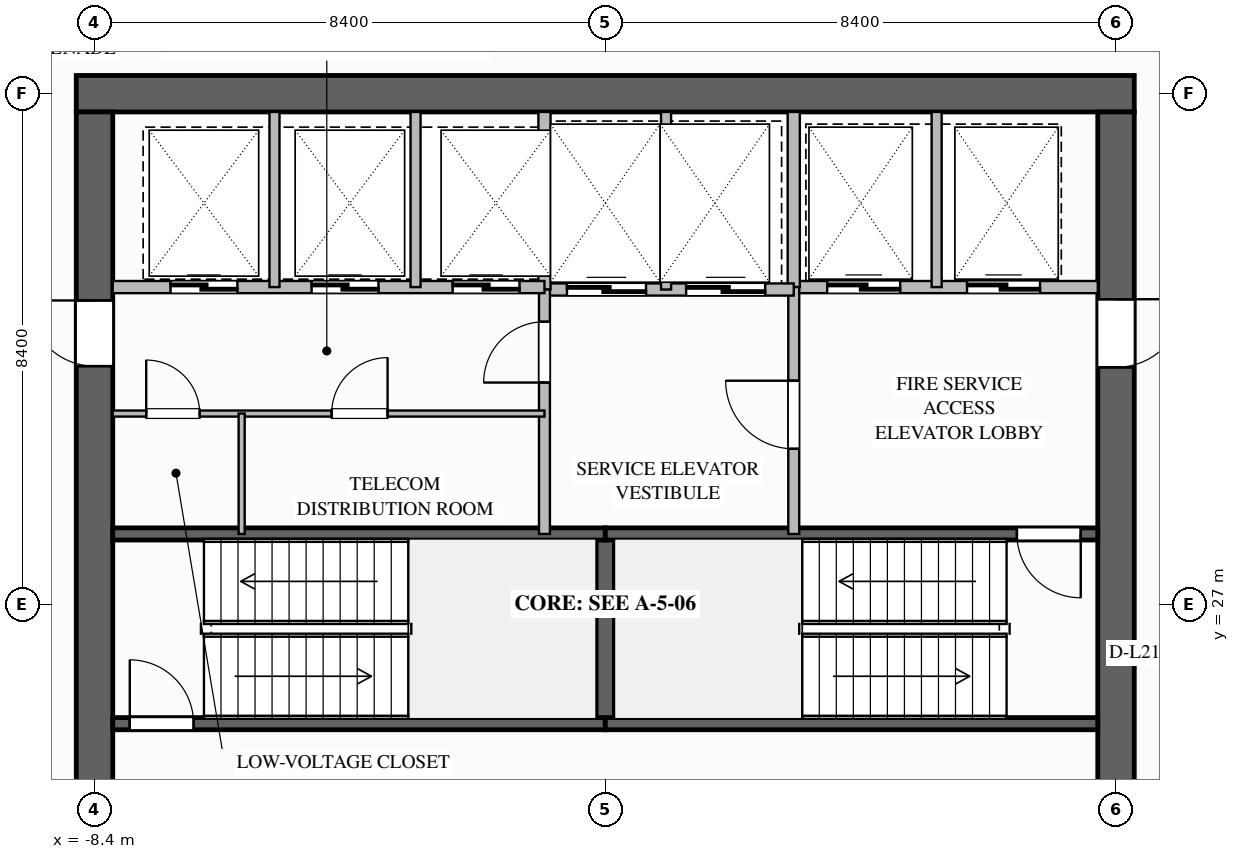
"""IFC4 building model, lengths in metres.
Left out: names, types, materials, properties, quantities, classifications, styles, units other than length and angle.
Written with IfcOpenShell. Run it as: python <this file> out.ifc"""

import sys

from ifc_helpers import new_model, si_unit, direction, frame, frame_2d, origin, place, context, subcontext, project, spatial, rectangle, extrude, element, fill, save


model = new_model("IFC4")
c1 = context("Model", 3, precision=1e-05, world=origin(), true_north=direction((0.0, 1.0)))
c2 = subcontext(c1, "Body", "Model", "MODEL_VIEW")
j1 = project(units=[si_unit("LENGTHUNIT", "METRE"), si_unit("PLANEANGLEUNIT", "RADIAN")], contexts=[c1])
p1 = place(None, origin())
s1 = spatial("IfcSite", under=j1, at=p1, CompositionType="ELEMENT")
p2 = place(p1, origin())
s2 = spatial("IfcBuilding", under=s1, at=p2, CompositionType="ELEMENT")
p3 = place(p2, frame((0.0, 0.0, 87.2)))
s3 = spatial("IfcBuildingStorey", under=s2, at=p3, CompositionType="ELEMENT", Elevation=87.2)
p4 = place(p3, frame((-8.7, 35.4, 0.0), z_axis=(0.0, 0.0, 1.0), x_axis=(1.0, 0.0, 0.0)))
e1 = element("IfcWall", 1, at=p4, inside=s3, PredefinedType="SHEAR", context=c2, shape_type="SweptSolid", body=[
    extrude(rectangle(XDim=17.4, YDim=0.6, at=frame_2d((8.7, 0.0))), origin(), (0.0, 0.0, 1.0), 4.6),
])
p5 = place(p3, frame((8.4, 35.1, 0.0), z_axis=(0.0, 0.0, 1.0), x_axis=(0.0, -1.0, 0.0)))
e2 = element("IfcWall", 2, at=p5, inside=s3, PredefinedType="SHEAR", context=c2, shape_type="SweptSolid", body=[
    extrude(rectangle(XDim=16.2, YDim=0.6, at=frame_2d((8.1, 0.0))), origin(), (0.0, 0.0, 1.0), 4.6),
])
p6 = place(p5, frame((3.08, 0.0, 0.0)))
e3 = element("IfcOpeningElement", 3, at=p6, cuts=e2, PredefinedType="OPENING", context=c2, shape_type="SweptSolid", body=[
    extrude(rectangle(XDim=1.12, YDim=2.1, at=frame_2d((0.56, 1.05))), frame((0.0, 0.31, 0.0), z_axis=(0.0, -1.0, 0.0), x_axis=(1.0, 0.0, 0.0)), (0.0, 0.0, 1.0), 0.62),
])
p7 = place(p5, frame((11.22, 0.0, 0.0)))
e4 = element("IfcOpeningElement", 4, at=p7, cuts=e2, PredefinedType="OPENING", context=c2, shape_type="SweptSolid", body=[
    extrude(rectangle(XDim=1.08, YDim=2.04, at=frame_2d((0.54, 1.02))), frame((0.0, 0.31, 0.0), z_axis=(0.0, -1.0, 0.0), x_axis=(1.0, 0.0, 0.0)), (0.0, 0.0, 1.0), 0.62),
])
p8 = place(p3, frame((-8.4, 18.9, 0.0), z_axis=(0.0, 0.0, 1.0), x_axis=(0.0, 1.0, 0.0)))
e5 = element("IfcWall", 5, at=p8, inside=s3, PredefinedType="SHEAR", context=c2, shape_type="SweptSolid", body=[
    extrude(rectangle(XDim=16.2, YDim=0.6, at=frame_2d((8.1, 0.0))), origin(), (0.0, 0.0, 1.0), 4.6),
])
p9 = place(p8, frame((12.02, 0.0, 0.0)))
e6 = element("IfcOpeningElement", 6, at=p9, cuts=e5, PredefinedType="OPENING", context=c2, shape_type="SweptSolid", body=[
    extrude(rectangle(XDim=1.08, YDim=2.04, at=frame_2d((0.54, 1.02))), frame((0.0, 0.31, 0.0), z_axis=(0.0, -1.0, 0.0), x_axis=(1.0, 0.0, 0.0)), (0.0, 0.0, 1.0), 0.62),
])
p10 = place(p8, frame((3.9, 0.0, 0.0)))
e7 = element("IfcOpeningElement", 7, at=p10, cuts=e5, PredefinedType="OPENING", context=c2, shape_type="SweptSolid", body=[
    extrude(rectangle(XDim=1.08, YDim=2.04, at=frame_2d((0.54, 1.02))), frame((0.0, 0.31, 0.0), z_axis=(0.0, -1.0, 0.0), x_axis=(1.0, 0.0, 0.0)), (0.0, 0.0, 1.0), 0.62),
])
p11 = place(p3, frame((0.0, 25.04, 0.0), z_axis=(0.0, 0.0, 1.0), x_axis=(0.0, 1.0, 0.0)))
e8 = element("IfcWall", 8, at=p11, inside=s3, PredefinedType="SOLIDWALL", context=c2, shape_type="SweptSolid", body=[
    extrude(rectangle(XDim=3.12, YDim=0.3, at=frame_2d((1.56, 0.0))), origin(), (0.0, 0.0, 1.0), 4.34),
])
p12 = place(p3, frame((-8.1, 25.04, 0.0), z_axis=(0.0, 0.0, 1.0), x_axis=(1.0, 0.0, 0.0)))
e9 = element("IfcWall", 9, at=p12, inside=s3, PredefinedType="SOLIDWALL", context=c2, shape_type="SweptSolid", body=[
    extrude(rectangle(XDim=8.1, YDim=0.2, at=frame_2d((4.05, 0.0))), origin(), (0.0, 0.0, 1.0), 4.34),
])
p13 = place(p12, frame((0.28, 0.0, 0.0)))
e10 = element("IfcOpeningElement", 10, at=p13, cuts=e9, PredefinedType="OPENING", context=c2, shape_type="SweptSolid", body=[
    extrude(rectangle(XDim=1.05, YDim=2.1, at=frame_2d((0.525, 1.05))), frame((0.0, 0.11, 0.0), z_axis=(0.0, -1.0, 0.0), x_axis=(1.0, 0.0, 0.0)), (0.0, 0.0, 1.0), 0.22),
])
for number, where, z_axis, x_axis in (
    (11, (-8.1, 28.16, 0.0), (0.0, 0.0, 1.0), (1.0, 0.0, 0.0)),
    (12, (0.0, 25.04, 0.0), (0.0, 0.0, 1.0), (1.0, 0.0, 0.0)),
):
    element("IfcWall", number, at=place(p3, frame(where, z_axis=z_axis, x_axis=x_axis)), inside=s3, PredefinedType="SOLIDWALL", context=c2, shape_type="SweptSolid", body=[
        extrude(rectangle(XDim=8.1, YDim=0.2, at=frame_2d((4.05, 0.0))), origin(), (0.0, 0.0, 1.0), 4.34),
    ])
p14 = place(p3, frame((8.1, 28.16, 0.0), z_axis=(0.0, 0.0, 1.0), x_axis=(-1.0, 0.0, 0.0)))
e13 = element("IfcWall", 13, at=p14, inside=s3, PredefinedType="SOLIDWALL", context=c2, shape_type="SweptSolid", body=[
    extrude(rectangle(XDim=8.1, YDim=0.2, at=frame_2d((4.05, 0.0))), origin(), (0.0, 0.0, 1.0), 4.34),
])
p15 = place(p14, frame((0.28, 0.0, 0.0)))
e14 = element("IfcOpeningElement", 14, at=p15, cuts=e13, PredefinedType="OPENING", context=c2, shape_type="SweptSolid", body=[
    extrude(rectangle(XDim=1.05, YDim=2.1, at=frame_2d((0.525, 1.05))), frame((0.0, 0.11, 0.0), z_axis=(0.0, -1.0, 0.0), x_axis=(1.0, 0.0, 0.0)), (0.0, 0.0, 1.0), 0.22),
])
p16 = place(p3, frame((3.1, 32.22, 0.0), z_axis=(0.0, 0.0, 1.0), x_axis=(1.0, 0.0, 0.0)))
e15 = element("IfcWall", 15, at=p16, inside=s3, PredefinedType="SOLIDWALL", context=c2, shape_type="SweptSolid", body=[
    extrude(rectangle(XDim=5.0, YDim=0.2, at=frame_2d((2.5, 0.0))), origin(), (0.0, 0.0, 1.0), 4.34),
])
p17 = place(p16, frame((0.55, 0.0, 0.0)))
e16 = element("IfcOpeningElement", 16, at=p17, cuts=e15, PredefinedType="OPENING", context=c2, shape_type="SweptSolid", body=[
    extrude(rectangle(XDim=1.2, YDim=2.2, at=frame_2d((0.6, 1.1))), frame((0.0, 0.11, 0.0), z_axis=(0.0, -1.0, 0.0), x_axis=(1.0, 0.0, 0.0)), (0.0, 0.0, 1.0), 0.22),
])
p18 = place(p16, frame((2.85, 0.0, 0.0)))
e17 = element("IfcOpeningElement", 17, at=p18, cuts=e15, PredefinedType="OPENING", context=c2, shape_type="SweptSolid", body=[
    extrude(rectangle(XDim=1.2, YDim=2.2, at=frame_2d((0.6, 1.1))), frame((0.0, 0.11, 0.0), z_axis=(0.0, -1.0, 0.0), x_axis=(1.0, 0.0, 0.0)), (0.0, 0.0, 1.0), 0.22),
])
p19 = place(p3, frame((3.1, 32.22, 0.0), z_axis=(0.0, 0.0, 1.0), x_axis=(0.0, 1.0, 0.0)))
e18 = element("IfcWall", 18, at=p19, inside=s3, PredefinedType="SOLIDWALL", context=c2, shape_type="SweptSolid", body=[
    extrude(rectangle(XDim=2.88, YDim=0.2, at=frame_2d((1.44, 0.0))), origin(), (0.0, 0.0, 1.0), 4.34),
])
p20 = place(p3, frame((5.45, 32.22, 0.0), z_axis=(0.0, 0.0, 1.0), x_axis=(0.0, 1.0, 0.0)))
e19 = element("IfcWall", 19, at=p20, inside=s3, PredefinedType="PARTITIONING", context=c2, shape_type="SweptSolid", body=[
    extrude(rectangle(XDim=2.88, YDim=0.165, at=frame_2d((1.44, 0.0))), origin(), (0.0, 0.0, 1.0), 4.34),
])
p21 = place(p3, frame((3.1, 28.16, 0.0), z_axis=(0.0, 0.0, 1.0), x_axis=(0.0, 1.0, 0.0)))
e20 = element("IfcWall", 20, at=p21, inside=s3, PredefinedType="SOLIDWALL", context=c2, shape_type="SweptSolid", body=[
    extrude(rectangle(XDim=4.06, YDim=0.18, at=frame_2d((2.03, 0.0))), origin(), (0.0, 0.0, 1.0), 4.34),
])
p22 = place(p21, frame((1.4, 0.0, 0.0)))
e21 = element("IfcOpeningElement", 21, at=p22, cuts=e20, PredefinedType="OPENING", context=c2, shape_type="SweptSolid", body=[
    extrude(rectangle(XDim=1.12, YDim=2.1, at=frame_2d((0.56, 1.05))), frame((0.0, 0.1, 0.0), z_axis=(0.0, -1.0, 0.0), x_axis=(1.0, 0.0, 0.0)), (0.0, 0.0, 1.0), 0.2),
])
p23 = place(p3, frame((-1.0, 32.18, 0.0), z_axis=(0.0, 0.0, 1.0), x_axis=(1.0, 0.0, 0.0)))
e22 = element("IfcWall", 22, at=p23, inside=s3, PredefinedType="SOLIDWALL", context=c2, shape_type="SweptSolid", body=[
    extrude(rectangle(XDim=4.1, YDim=0.2, at=frame_2d((2.05, 0.0))), origin(), (0.0, 0.0, 1.0), 4.34),
])
p24 = place(p23, frame((0.37, 0.0, 0.0)))
e23 = element("IfcOpeningElement", 23, at=p24, cuts=e22, PredefinedType="OPENING", context=c2, shape_type="SweptSolid", body=[
    extrude(rectangle(XDim=1.3, YDim=2.2, at=frame_2d((0.65, 1.1))), frame((0.0, 0.11, 0.0), z_axis=(0.0, -1.0, 0.0), x_axis=(1.0, 0.0, 0.0)), (0.0, 0.0, 1.0), 0.22),
])
p25 = place(p23, frame((2.33, 0.0, 0.0)))
e24 = element("IfcOpeningElement", 24, at=p25, cuts=e22, PredefinedType="OPENING", context=c2, shape_type="SweptSolid", body=[
    extrude(rectangle(XDim=1.3, YDim=2.2, at=frame_2d((0.65, 1.1))), frame((0.0, 0.11, 0.0), z_axis=(0.0, -1.0, 0.0), x_axis=(1.0, 0.0, 0.0)), (0.0, 0.0, 1.0), 0.22),
])
p26 = place(p3, frame((-1.0, 32.18, 0.0), z_axis=(0.0, 0.0, 1.0), x_axis=(0.0, 1.0, 0.0)))
e25 = element("IfcWall", 25, at=p26, inside=s3, PredefinedType="SOLIDWALL", context=c2, shape_type="SweptSolid", body=[
    extrude(rectangle(XDim=2.92, YDim=0.2, at=frame_2d((1.46, 0.0))), origin(), (0.0, 0.0, 1.0), 4.34),
])
p27 = place(p3, frame((1.0, 32.18, 0.0), z_axis=(0.0, 0.0, 1.0), x_axis=(0.0, 1.0, 0.0)))
e26 = element("IfcWall", 26, at=p27, inside=s3, PredefinedType="PARTITIONING", context=c2, shape_type="SweptSolid", body=[
    extrude(rectangle(XDim=2.92, YDim=0.165, at=frame_2d((1.46, 0.0))), origin(), (0.0, 0.0, 1.0), 4.34),
])
p28 = place(p3, frame((-1.0, 28.16, 0.0), z_axis=(0.0, 0.0, 1.0), x_axis=(0.0, 1.0, 0.0)))
e27 = element("IfcWall", 27, at=p28, inside=s3, PredefinedType="SOLIDWALL", context=c2, shape_type="SweptSolid", body=[
    extrude(rectangle(XDim=4.02, YDim=0.18, at=frame_2d((2.01, 0.0))), origin(), (0.0, 0.0, 1.0), 4.34),
])
p29 = place(p28, frame((2.49, 0.0, 0.0)))
e28 = element("IfcOpeningElement", 28, at=p29, cuts=e27, PredefinedType="OPENING", context=c2, shape_type="SweptSolid", body=[
    extrude(rectangle(XDim=1.0, YDim=2.1, at=frame_2d((0.5, 1.05))), frame((0.0, 0.1, 0.0), z_axis=(0.0, -1.0, 0.0), x_axis=(1.0, 0.0, 0.0)), (0.0, 0.0, 1.0), 0.2),
])
p30 = place(p3, frame((-8.1, 32.22, 0.0), z_axis=(0.0, 0.0, 1.0), x_axis=(1.0, 0.0, 0.0)))
e29 = element("IfcWall", 29, at=p30, inside=s3, PredefinedType="SOLIDWALL", context=c2, shape_type="SweptSolid", body=[
    extrude(rectangle(XDim=7.1, YDim=0.2, at=frame_2d((3.55, 0.0))), origin(), (0.0, 0.0, 1.0), 4.34),
])
p31 = place(p30, frame((0.95, 0.0, 0.0)))
e30 = element("IfcOpeningElement", 30, at=p31, cuts=e29, PredefinedType="OPENING", context=c2, shape_type="SweptSolid", body=[
    extrude(rectangle(XDim=1.1, YDim=2.2, at=frame_2d((0.55, 1.1))), frame((0.0, 0.11, 0.0), z_axis=(0.0, -1.0, 0.0), x_axis=(1.0, 0.0, 0.0)), (0.0, 0.0, 1.0), 0.22),
])
p32 = place(p30, frame((3.27, 0.0, 0.0)))
e31 = element("IfcOpeningElement", 31, at=p32, cuts=e29, PredefinedType="OPENING", context=c2, shape_type="SweptSolid", body=[
    extrude(rectangle(XDim=1.1, YDim=2.2, at=frame_2d((0.55, 1.1))), frame((0.0, 0.11, 0.0), z_axis=(0.0, -1.0, 0.0), x_axis=(1.0, 0.0, 0.0)), (0.0, 0.0, 1.0), 0.22),
])
p33 = place(p30, frame((5.59, 0.0, 0.0)))
e32 = element("IfcOpeningElement", 32, at=p33, cuts=e29, PredefinedType="OPENING", context=c2, shape_type="SweptSolid", body=[
    extrude(rectangle(XDim=1.1, YDim=2.2, at=frame_2d((0.55, 1.1))), frame((0.0, 0.11, 0.0), z_axis=(0.0, -1.0, 0.0), x_axis=(1.0, 0.0, 0.0)), (0.0, 0.0, 1.0), 0.22),
])
for number, where, z_axis, x_axis in (
    (33, (-5.44, 32.22, 0.0), (0.0, 0.0, 1.0), (0.0, 1.0, 0.0)),
    (34, (-3.12, 32.22, 0.0), (0.0, 0.0, 1.0), (0.0, 1.0, 0.0)),
):
    element("IfcWall", number, at=place(p3, frame(where, z_axis=z_axis, x_axis=x_axis)), inside=s3, PredefinedType="PARTITIONING", context=c2, shape_type="SweptSolid", body=[
        extrude(rectangle(XDim=2.88, YDim=0.165, at=frame_2d((1.44, 0.0))), origin(), (0.0, 0.0, 1.0), 4.34),
    ])
p34 = place(p3, frame((-8.1, 30.14, 0.0), z_axis=(0.0, 0.0, 1.0), x_axis=(1.0, 0.0, 0.0)))
e35 = element("IfcWall", 35, at=p34, inside=s3, PredefinedType="PARTITIONING", context=c2, shape_type="SweptSolid", body=[
    extrude(rectangle(XDim=7.1, YDim=0.1, at=frame_2d((3.55, 0.0))), origin(), (0.0, 0.0, 1.0), 4.34),
])
p35 = place(p34, frame((0.55, 0.0, 0.0)))
e36 = element("IfcOpeningElement", 36, at=p35, cuts=e35, PredefinedType="OPENING", context=c2, shape_type="SweptSolid", body=[
    extrude(rectangle(XDim=0.88, YDim=2.1, at=frame_2d((0.44, 1.05))), frame((0.0, 0.06, 0.0), z_axis=(0.0, -1.0, 0.0), x_axis=(1.0, 0.0, 0.0)), (0.0, 0.0, 1.0), 0.12),
])
p36 = place(p34, frame((3.6, 0.0, 0.0)))
e37 = element("IfcOpeningElement", 37, at=p36, cuts=e35, PredefinedType="OPENING", context=c2, shape_type="SweptSolid", body=[
    extrude(rectangle(XDim=0.92, YDim=2.1, at=frame_2d((0.46, 1.05))), frame((0.0, 0.06, 0.0), z_axis=(0.0, -1.0, 0.0), x_axis=(1.0, 0.0, 0.0)), (0.0, 0.0, 1.0), 0.12),
])
p37 = place(p3, frame((-5.98, 28.16, 0.0), z_axis=(0.0, 0.0, 1.0), x_axis=(0.0, 1.0, 0.0)))
e38 = element("IfcWall", 38, at=p37, inside=s3, PredefinedType="PARTITIONING", context=c2, shape_type="SweptSolid", body=[
    extrude(rectangle(XDim=1.98, YDim=0.1, at=frame_2d((0.99, 0.0))), origin(), (0.0, 0.0, 1.0), 4.34),
])
p38 = place(p13, origin())
e39 = element("IfcDoor", 39, at=p38, inside=s3, OperationType="SINGLE_SWING_LEFT", PredefinedType="DOOR", context=c2, shape_type="SweptSolid", body=[
    extrude(rectangle(XDim=1.05, YDim=2.1, at=frame_2d((0.525, 1.05))), frame((0.0, 0.025, 0.0), z_axis=(0.0, -1.0, 0.0), x_axis=(1.0, 0.0, 0.0)), (0.0, 0.0, 1.0), 0.05),
])
fill(e10, e39)
p39 = place(p15, origin())
e40 = element("IfcDoor", 40, at=p39, inside=s3, OperationType="SINGLE_SWING_LEFT", PredefinedType="DOOR", context=c2, shape_type="SweptSolid", body=[
    extrude(rectangle(XDim=1.05, YDim=2.1, at=frame_2d((0.525, 1.05))), frame((0.0, 0.025, 0.0), z_axis=(0.0, -1.0, 0.0), x_axis=(1.0, 0.0, 0.0)), (0.0, 0.0, 1.0), 0.05),
])
fill(e14, e40)
p40 = place(p17, origin())
e41 = element("IfcDoor", 41, at=p40, inside=s3, OperationType="SLIDING_TO_LEFT", PredefinedType="DOOR", context=c2, shape_type="SweptSolid", body=[
    extrude(rectangle(XDim=1.2, YDim=2.2, at=frame_2d((0.6, 1.1))), frame((0.0, 0.025, 0.0), z_axis=(0.0, -1.0, 0.0), x_axis=(1.0, 0.0, 0.0)), (0.0, 0.0, 1.0), 0.05),
])
fill(e16, e41)
p41 = place(p18, origin())
e42 = element("IfcDoor", 42, at=p41, inside=s3, OperationType="SLIDING_TO_LEFT", PredefinedType="DOOR", context=c2, shape_type="SweptSolid", body=[
    extrude(rectangle(XDim=1.2, YDim=2.2, at=frame_2d((0.6, 1.1))), frame((0.0, 0.025, 0.0), z_axis=(0.0, -1.0, 0.0), x_axis=(1.0, 0.0, 0.0)), (0.0, 0.0, 1.0), 0.05),
])
fill(e17, e42)
p42 = place(p22, origin())
e43 = element("IfcDoor", 43, at=p42, inside=s3, OperationType="SINGLE_SWING_RIGHT", PredefinedType="DOOR", context=c2, shape_type="SweptSolid", body=[
    extrude(rectangle(XDim=1.12, YDim=2.1, at=frame_2d((0.56, 1.05))), frame((0.0, 0.025, 0.0), z_axis=(0.0, -1.0, 0.0), x_axis=(1.0, 0.0, 0.0)), (0.0, 0.0, 1.0), 0.05),
])
fill(e21, e43)
p43 = place(p6, origin())
e44 = element("IfcDoor", 44, at=p43, inside=s3, OperationType="SINGLE_SWING_LEFT", PredefinedType="DOOR", context=c2, shape_type="SweptSolid", body=[
    extrude(rectangle(XDim=1.12, YDim=2.1, at=frame_2d((0.56, 1.05))), frame((0.0, 0.025, 0.0), z_axis=(0.0, -1.0, 0.0), x_axis=(1.0, 0.0, 0.0)), (0.0, 0.0, 1.0), 0.05),
])
fill(e3, e44)
p44 = place(p24, origin())
e45 = element("IfcDoor", 45, at=p44, inside=s3, OperationType="SLIDING_TO_LEFT", PredefinedType="DOOR", context=c2, shape_type="SweptSolid", body=[
    extrude(rectangle(XDim=1.3, YDim=2.2, at=frame_2d((0.65, 1.1))), frame((0.0, 0.025, 0.0), z_axis=(0.0, -1.0, 0.0), x_axis=(1.0, 0.0, 0.0)), (0.0, 0.0, 1.0), 0.05),
])
fill(e23, e45)
p45 = place(p25, origin())
e46 = element("IfcDoor", 46, at=p45, inside=s3, OperationType="SLIDING_TO_LEFT", PredefinedType="DOOR", context=c2, shape_type="SweptSolid", body=[
    extrude(rectangle(XDim=1.3, YDim=2.2, at=frame_2d((0.65, 1.1))), frame((0.0, 0.025, 0.0), z_axis=(0.0, -1.0, 0.0), x_axis=(1.0, 0.0, 0.0)), (0.0, 0.0, 1.0), 0.05),
])
fill(e24, e46)
p46 = place(p29, origin())
e47 = element("IfcDoor", 47, at=p46, inside=s3, OperationType="SINGLE_SWING_LEFT", PredefinedType="DOOR", context=c2, shape_type="SweptSolid", body=[
    extrude(rectangle(XDim=1.0, YDim=2.1, at=frame_2d((0.5, 1.05))), frame((0.0, 0.025, 0.0), z_axis=(0.0, -1.0, 0.0), x_axis=(1.0, 0.0, 0.0)), (0.0, 0.0, 1.0), 0.05),
])
fill(e28, e47)
p47 = place(p31, origin())
e48 = element("IfcDoor", 48, at=p47, inside=s3, OperationType="SLIDING_TO_LEFT", PredefinedType="DOOR", context=c2, shape_type="SweptSolid", body=[
    extrude(rectangle(XDim=1.1, YDim=2.2, at=frame_2d((0.55, 1.1))), frame((0.0, 0.025, 0.0), z_axis=(0.0, -1.0, 0.0), x_axis=(1.0, 0.0, 0.0)), (0.0, 0.0, 1.0), 0.05),
])
fill(e30, e48)
p48 = place(p32, origin())
e49 = element("IfcDoor", 49, at=p48, inside=s3, OperationType="SLIDING_TO_LEFT", PredefinedType="DOOR", context=c2, shape_type="SweptSolid", body=[
    extrude(rectangle(XDim=1.1, YDim=2.2, at=frame_2d((0.55, 1.1))), frame((0.0, 0.025, 0.0), z_axis=(0.0, -1.0, 0.0), x_axis=(1.0, 0.0, 0.0)), (0.0, 0.0, 1.0), 0.05),
])
fill(e31, e49)
p49 = place(p33, origin())
e50 = element("IfcDoor", 50, at=p49, inside=s3, OperationType="SLIDING_TO_LEFT", PredefinedType="DOOR", context=c2, shape_type="SweptSolid", body=[
    extrude(rectangle(XDim=1.1, YDim=2.2, at=frame_2d((0.55, 1.1))), frame((0.0, 0.025, 0.0), z_axis=(0.0, -1.0, 0.0), x_axis=(1.0, 0.0, 0.0)), (0.0, 0.0, 1.0), 0.05),
])
fill(e32, e50)
p50 = place(p9, origin())
e51 = element("IfcDoor", 51, at=p50, inside=s3, OperationType="SINGLE_SWING_RIGHT", PredefinedType="DOOR", context=c2, shape_type="SweptSolid", body=[
    extrude(rectangle(XDim=1.08, YDim=2.04, at=frame_2d((0.54, 1.02))), frame((0.0, 0.025, 0.0), z_axis=(0.0, -1.0, 0.0), x_axis=(1.0, 0.0, 0.0)), (0.0, 0.0, 1.0), 0.05),
])
fill(e6, e51)
p51 = place(p35, origin())
e52 = element("IfcDoor", 52, at=p51, inside=s3, OperationType="SINGLE_SWING_LEFT", PredefinedType="DOOR", context=c2, shape_type="SweptSolid", body=[
    extrude(rectangle(XDim=0.88, YDim=2.1, at=frame_2d((0.44, 1.05))), frame((0.0, 0.025, 0.0), z_axis=(0.0, -1.0, 0.0), x_axis=(1.0, 0.0, 0.0)), (0.0, 0.0, 1.0), 0.05),
])
fill(e36, e52)
p52 = place(p36, origin())
e53 = element("IfcDoor", 53, at=p52, inside=s3, OperationType="SINGLE_SWING_RIGHT", PredefinedType="DOOR", context=c2, shape_type="SweptSolid", body=[
    extrude(rectangle(XDim=0.92, YDim=2.1, at=frame_2d((0.46, 1.05))), frame((0.0, 0.025, 0.0), z_axis=(0.0, -1.0, 0.0), x_axis=(1.0, 0.0, 0.0)), (0.0, 0.0, 1.0), 0.05),
])
fill(e37, e53)
save(model, sys.argv[1])
